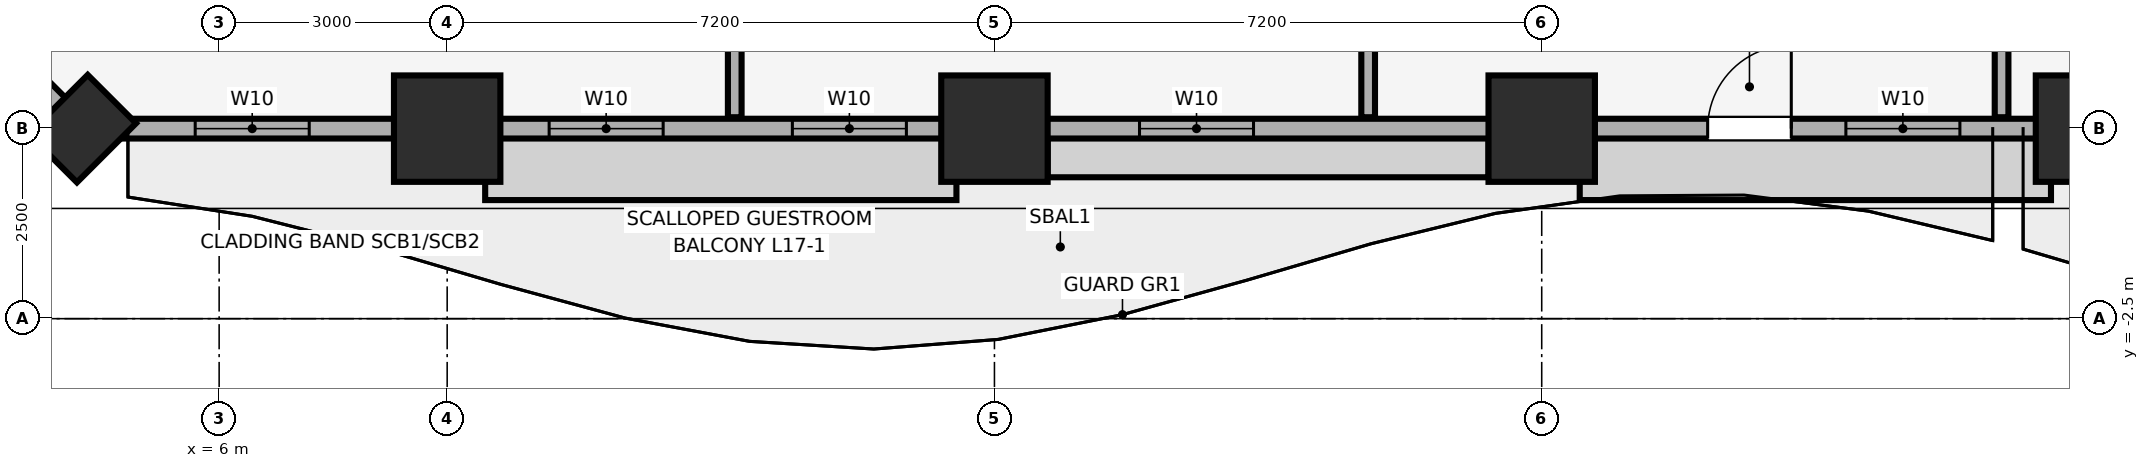
"""IFC4 building model, lengths in metres.
Left out: names, types, materials, properties, quantities, classifications, styles, units other than length and angle.
Written with IfcOpenShell. Run it as: python <this file> out.ifc"""

import sys

from ifc_helpers import new_model, si_unit, direction, frame, frame_2d, origin, origin_2d, place, context, subcontext, project, spatial, rectangle, extrude, element, fill, save


model = new_model("IFC4")
c1 = context("Model", 3, precision=1e-05, world=origin(), true_north=direction((0.0, 1.0)))
c2 = subcontext(c1, "Body", "Model", "MODEL_VIEW")
j1 = project(units=[si_unit("LENGTHUNIT", "METRE"), si_unit("PLANEANGLEUNIT", "RADIAN")], contexts=[c1])
p1 = place(None, origin())
s1 = spatial("IfcSite", under=j1, at=p1, CompositionType="ELEMENT")
p2 = place(p1, origin())
s2 = spatial("IfcBuilding", under=s1, at=p2, CompositionType="ELEMENT")
p3 = place(p2, frame((0.0, 0.0, 76.4)))
s3 = spatial("IfcBuildingStorey", under=s2, at=p3, CompositionType="ELEMENT", Elevation=76.4)
for number, where, z_axis, x_axis in (
    (1, (9.0, 0.0, 0.0), (0.0, 0.0, 1.0), (1.0, 0.0, 0.0)),
    (2, (16.2, 0.0, 0.0), (0.0, 0.0, 1.0), (1.0, 0.0, 0.0)),
    (3, (23.4, 0.0, 0.0), (0.0, 0.0, 1.0), (1.0, 0.0, 0.0)),
    (4, (30.6, 0.0, 0.0), (0.0, 0.0, 1.0), (1.0, 0.0, 0.0)),
):
    element("IfcColumn", number, at=place(p3, frame(where, z_axis=z_axis, x_axis=x_axis)), inside=s3, PredefinedType="COLUMN", context=c2, shape_type="SweptSolid", body=[
        extrude(rectangle(XDim=1.4, YDim=1.4, at=origin_2d()), origin(), (0.0, 0.0, 1.0), 3.4),
    ])
p4 = place(p3, frame((4.2, 0.0, 0.0), z_axis=(0.0, 0.0, 1.0), x_axis=(0.707106781187, 0.707106781187, 0.0)))
e5 = element("IfcColumn", 5, at=p4, inside=s3, PredefinedType="PILASTER", context=c2, shape_type="SweptSolid", body=[
    extrude(rectangle(XDim=1.1, YDim=0.9, at=origin_2d()), origin(), (0.0, 0.0, 1.0), 3.4),
])
p5 = place(p3, frame((4.2, 0.0, 0.0), z_axis=(0.0, 0.0, 1.0), x_axis=(1.0, 0.0, 0.0)))
e6 = element("IfcWall", 6, at=p5, inside=s3, PredefinedType="SOLIDWALL", context=c2, shape_type="SweptSolid", body=[
    extrude(rectangle(XDim=75.6, YDim=0.26, at=frame_2d((37.8, 0.0))), origin(), (0.0, 0.0, 1.0), 2.45),
])
p6 = place(p5, frame((21.383, 0.0, 0.0)))
e7 = element("IfcOpeningElement", 7, at=p6, cuts=e6, PredefinedType="OPENING", context=c2, shape_type="SweptSolid", body=[
    extrude(rectangle(XDim=1.1, YDim=2.15, at=frame_2d((0.55, 1.075))), frame((0.0, 0.14, 0.0), z_axis=(0.0, -1.0, 0.0), x_axis=(1.0, 0.0, 0.0)), (0.0, 0.0, 1.0), 0.28),
])
p7 = place(p5, frame((37.25, 0.0, 0.0)))
e8 = element("IfcOpeningElement", 8, at=p7, cuts=e6, PredefinedType="OPENING", context=c2, shape_type="SweptSolid", body=[
    extrude(rectangle(XDim=1.1, YDim=2.15, at=frame_2d((0.55, 1.075))), frame((0.0, 0.14, 0.0), z_axis=(0.0, -1.0, 0.0), x_axis=(1.0, 0.0, 0.0)), (0.0, 0.0, 1.0), 0.28),
])
p8 = place(p5, frame((53.117, 0.0, 0.0)))
e9 = element("IfcOpeningElement", 9, at=p8, cuts=e6, PredefinedType="OPENING", context=c2, shape_type="SweptSolid", body=[
    extrude(rectangle(XDim=1.1, YDim=2.15, at=frame_2d((0.55, 1.075))), frame((0.0, 0.14, 0.0), z_axis=(0.0, -1.0, 0.0), x_axis=(1.0, 0.0, 0.0)), (0.0, 0.0, 1.0), 0.28),
])
p9 = place(p5, frame((1.485, 0.0, 0.85)))
e10 = element("IfcOpeningElement", 10, at=p9, cuts=e6, PredefinedType="OPENING", context=c2, shape_type="SweptSolid", body=[
    extrude(rectangle(XDim=1.5, YDim=1.4, at=frame_2d((0.75, 0.7))), frame((0.0, 0.14, 0.0), z_axis=(0.0, -1.0, 0.0), x_axis=(1.0, 0.0, 0.0)), (0.0, 0.0, 1.0), 0.28),
])
p10 = place(p5, frame((6.142, 0.0, 0.85)))
e11 = element("IfcOpeningElement", 11, at=p10, cuts=e6, PredefinedType="OPENING", context=c2, shape_type="SweptSolid", body=[
    extrude(rectangle(XDim=1.5, YDim=1.4, at=frame_2d((0.75, 0.7))), frame((0.0, 0.14, 0.0), z_axis=(0.0, -1.0, 0.0), x_axis=(1.0, 0.0, 0.0)), (0.0, 0.0, 1.0), 0.28),
])
p11 = place(p5, frame((9.342, 0.0, 0.85)))
e12 = element("IfcOpeningElement", 12, at=p11, cuts=e6, PredefinedType="OPENING", context=c2, shape_type="SweptSolid", body=[
    extrude(rectangle(XDim=1.5, YDim=1.4, at=frame_2d((0.75, 0.7))), frame((0.0, 0.14, 0.0), z_axis=(0.0, -1.0, 0.0), x_axis=(1.0, 0.0, 0.0)), (0.0, 0.0, 1.0), 0.28),
])
p12 = place(p5, frame((13.908, 0.0, 0.85)))
e13 = element("IfcOpeningElement", 13, at=p12, cuts=e6, PredefinedType="OPENING", context=c2, shape_type="SweptSolid", body=[
    extrude(rectangle(XDim=1.5, YDim=1.4, at=frame_2d((0.75, 0.7))), frame((0.0, 0.14, 0.0), z_axis=(0.0, -1.0, 0.0), x_axis=(1.0, 0.0, 0.0)), (0.0, 0.0, 1.0), 0.28),
])
p13 = place(p5, frame((23.202, 0.0, 0.85)))
e14 = element("IfcOpeningElement", 14, at=p13, cuts=e6, PredefinedType="OPENING", context=c2, shape_type="SweptSolid", body=[
    extrude(rectangle(XDim=1.5, YDim=1.4, at=frame_2d((0.75, 0.7))), frame((0.0, 0.14, 0.0), z_axis=(0.0, -1.0, 0.0), x_axis=(1.0, 0.0, 0.0)), (0.0, 0.0, 1.0), 0.28),
])
p14 = place(p5, frame((29.25, 0.0, 0.85)))
e15 = element("IfcOpeningElement", 15, at=p14, cuts=e6, PredefinedType="OPENING", context=c2, shape_type="SweptSolid", body=[
    extrude(rectangle(XDim=1.5, YDim=1.4, at=frame_2d((0.75, 0.7))), frame((0.0, 0.14, 0.0), z_axis=(0.0, -1.0, 0.0), x_axis=(1.0, 0.0, 0.0)), (0.0, 0.0, 1.0), 0.28),
])
p15 = place(p5, frame((34.79, 0.0, 0.85)))
e16 = element("IfcOpeningElement", 16, at=p15, cuts=e6, PredefinedType="OPENING", context=c2, shape_type="SweptSolid", body=[
    extrude(rectangle(XDim=1.5, YDim=1.4, at=frame_2d((0.75, 0.7))), frame((0.0, 0.14, 0.0), z_axis=(0.0, -1.0, 0.0), x_axis=(1.0, 0.0, 0.0)), (0.0, 0.0, 1.0), 0.28),
])
p16 = place(p5, frame((39.31, 0.0, 0.85)))
e17 = element("IfcOpeningElement", 17, at=p16, cuts=e6, PredefinedType="OPENING", context=c2, shape_type="SweptSolid", body=[
    extrude(rectangle(XDim=1.5, YDim=1.4, at=frame_2d((0.75, 0.7))), frame((0.0, 0.14, 0.0), z_axis=(0.0, -1.0, 0.0), x_axis=(1.0, 0.0, 0.0)), (0.0, 0.0, 1.0), 0.28),
])
p17 = place(p5, frame((44.85, 0.0, 0.85)))
e18 = element("IfcOpeningElement", 18, at=p17, cuts=e6, PredefinedType="OPENING", context=c2, shape_type="SweptSolid", body=[
    extrude(rectangle(XDim=1.5, YDim=1.4, at=frame_2d((0.75, 0.7))), frame((0.0, 0.14, 0.0), z_axis=(0.0, -1.0, 0.0), x_axis=(1.0, 0.0, 0.0)), (0.0, 0.0, 1.0), 0.28),
])
p18 = place(p5, frame((50.848, 0.0, 0.85)))
e19 = element("IfcOpeningElement", 19, at=p18, cuts=e6, PredefinedType="OPENING", context=c2, shape_type="SweptSolid", body=[
    extrude(rectangle(XDim=1.5, YDim=1.4, at=frame_2d((0.75, 0.7))), frame((0.0, 0.14, 0.0), z_axis=(0.0, -1.0, 0.0), x_axis=(1.0, 0.0, 0.0)), (0.0, 0.0, 1.0), 0.28),
])
p19 = place(p5, frame((60.142, 0.0, 0.85)))
e20 = element("IfcOpeningElement", 20, at=p19, cuts=e6, PredefinedType="OPENING", context=c2, shape_type="SweptSolid", body=[
    extrude(rectangle(XDim=1.5, YDim=1.4, at=frame_2d((0.75, 0.7))), frame((0.0, 0.14, 0.0), z_axis=(0.0, -1.0, 0.0), x_axis=(1.0, 0.0, 0.0)), (0.0, 0.0, 1.0), 0.28),
])
p20 = place(p5, frame((64.708, 0.0, 0.85)))
e21 = element("IfcOpeningElement", 21, at=p20, cuts=e6, PredefinedType="OPENING", context=c2, shape_type="SweptSolid", body=[
    extrude(rectangle(XDim=1.5, YDim=1.4, at=frame_2d((0.75, 0.7))), frame((0.0, 0.14, 0.0), z_axis=(0.0, -1.0, 0.0), x_axis=(1.0, 0.0, 0.0)), (0.0, 0.0, 1.0), 0.28),
])
p21 = place(p5, frame((67.908, 0.0, 0.85)))
e22 = element("IfcOpeningElement", 22, at=p21, cuts=e6, PredefinedType="OPENING", context=c2, shape_type="SweptSolid", body=[
    extrude(rectangle(XDim=1.5, YDim=1.4, at=frame_2d((0.75, 0.7))), frame((0.0, 0.14, 0.0), z_axis=(0.0, -1.0, 0.0), x_axis=(1.0, 0.0, 0.0)), (0.0, 0.0, 1.0), 0.28),
])
p22 = place(p5, frame((72.615, 0.0, 0.85)))
e23 = element("IfcOpeningElement", 23, at=p22, cuts=e6, PredefinedType="OPENING", context=c2, shape_type="SweptSolid", body=[
    extrude(rectangle(XDim=1.5, YDim=1.4, at=frame_2d((0.75, 0.7))), frame((0.0, 0.14, 0.0), z_axis=(0.0, -1.0, 0.0), x_axis=(1.0, 0.0, 0.0)), (0.0, 0.0, 1.0), 0.28),
])
p23 = place(p3, frame((0.0, 4.2, 0.0), z_axis=(0.0, 0.0, 1.0), x_axis=(0.707106781187, -0.707106781187, 0.0)))
e24 = element("IfcWall", 24, at=p23, inside=s3, PredefinedType="SOLIDWALL", context=c2, shape_type="SweptSolid", body=[
    extrude(rectangle(XDim=5.94, YDim=0.26, at=frame_2d((2.97, 0.0))), origin(), (0.0, 0.0, 1.0), 2.45),
])
p24 = place(p3, frame((12.783, 0.15, 0.0), z_axis=(0.0, 0.0, 1.0), x_axis=(0.0, 1.0, 0.0)))
e25 = element("IfcWall", 25, at=p24, inside=s3, PredefinedType="PARTITIONING", context=c2, shape_type="SweptSolid", body=[
    extrude(rectangle(XDim=18.955, YDim=0.18, at=frame_2d((9.478, 0.0))), origin(), (0.0, 0.0, 1.0), 2.8),
])
for number, where, z_axis, x_axis in (
    (26, (21.117, 0.15, 0.0), (0.0, 0.0, 1.0), (0.0, 1.0, 0.0)),
    (27, (29.45, 0.15, 0.0), (0.0, 0.0, 1.0), (0.0, 1.0, 0.0)),
):
    element("IfcWall", number, at=place(p3, frame(where, z_axis=z_axis, x_axis=x_axis)), inside=s3, PredefinedType="PARTITIONING", context=c2, shape_type="SweptSolid", body=[
        extrude(rectangle(XDim=18.955, YDim=0.18, at=frame_2d((9.478, 0.0))), origin(), (0.0, 0.0, 1.0), 3.4),
    ])
p25 = place(p6, origin())
e28 = element("IfcDoor", 28, at=p25, inside=s3, OperationType="SINGLE_SWING_RIGHT", PredefinedType="DOOR", context=c2, shape_type="SweptSolid", body=[
    extrude(rectangle(XDim=1.1, YDim=2.15, at=frame_2d((0.55, 1.075))), frame((0.0, 0.025, 0.0), z_axis=(0.0, -1.0, 0.0), x_axis=(1.0, 0.0, 0.0)), (0.0, 0.0, 1.0), 0.05),
])
fill(e7, e28)
p26 = place(p9, origin())
e29 = element("IfcWindow", 29, at=p26, inside=s3, PartitioningType="SINGLE_PANEL", PredefinedType="WINDOW", context=c2, shape_type="SweptSolid", body=[
    extrude(rectangle(XDim=1.5, YDim=1.4, at=frame_2d((0.75, 0.7))), frame((0.0, 0.03, 0.0), z_axis=(0.0, -1.0, 0.0), x_axis=(1.0, 0.0, 0.0)), (0.0, 0.0, 1.0), 0.06),
])
fill(e10, e29)
p27 = place(p10, origin())
e30 = element("IfcWindow", 30, at=p27, inside=s3, PartitioningType="SINGLE_PANEL", PredefinedType="WINDOW", context=c2, shape_type="SweptSolid", body=[
    extrude(rectangle(XDim=1.5, YDim=1.4, at=frame_2d((0.75, 0.7))), frame((0.0, 0.03, 0.0), z_axis=(0.0, -1.0, 0.0), x_axis=(1.0, 0.0, 0.0)), (0.0, 0.0, 1.0), 0.06),
])
fill(e11, e30)
p28 = place(p11, origin())
e31 = element("IfcWindow", 31, at=p28, inside=s3, PartitioningType="SINGLE_PANEL", PredefinedType="WINDOW", context=c2, shape_type="SweptSolid", body=[
    extrude(rectangle(XDim=1.5, YDim=1.4, at=frame_2d((0.75, 0.7))), frame((0.0, 0.03, 0.0), z_axis=(0.0, -1.0, 0.0), x_axis=(1.0, 0.0, 0.0)), (0.0, 0.0, 1.0), 0.06),
])
fill(e12, e31)
p29 = place(p12, origin())
e32 = element("IfcWindow", 32, at=p29, inside=s3, PartitioningType="SINGLE_PANEL", PredefinedType="WINDOW", context=c2, shape_type="SweptSolid", body=[
    extrude(rectangle(XDim=1.5, YDim=1.4, at=frame_2d((0.75, 0.7))), frame((0.0, 0.03, 0.0), z_axis=(0.0, -1.0, 0.0), x_axis=(1.0, 0.0, 0.0)), (0.0, 0.0, 1.0), 0.06),
])
fill(e13, e32)
p30 = place(p13, origin())
e33 = element("IfcWindow", 33, at=p30, inside=s3, PartitioningType="SINGLE_PANEL", PredefinedType="WINDOW", context=c2, shape_type="SweptSolid", body=[
    extrude(rectangle(XDim=1.5, YDim=1.4, at=frame_2d((0.75, 0.7))), frame((0.0, 0.03, 0.0), z_axis=(0.0, -1.0, 0.0), x_axis=(1.0, 0.0, 0.0)), (0.0, 0.0, 1.0), 0.06),
])
fill(e14, e33)
save(model, sys.argv[1])
